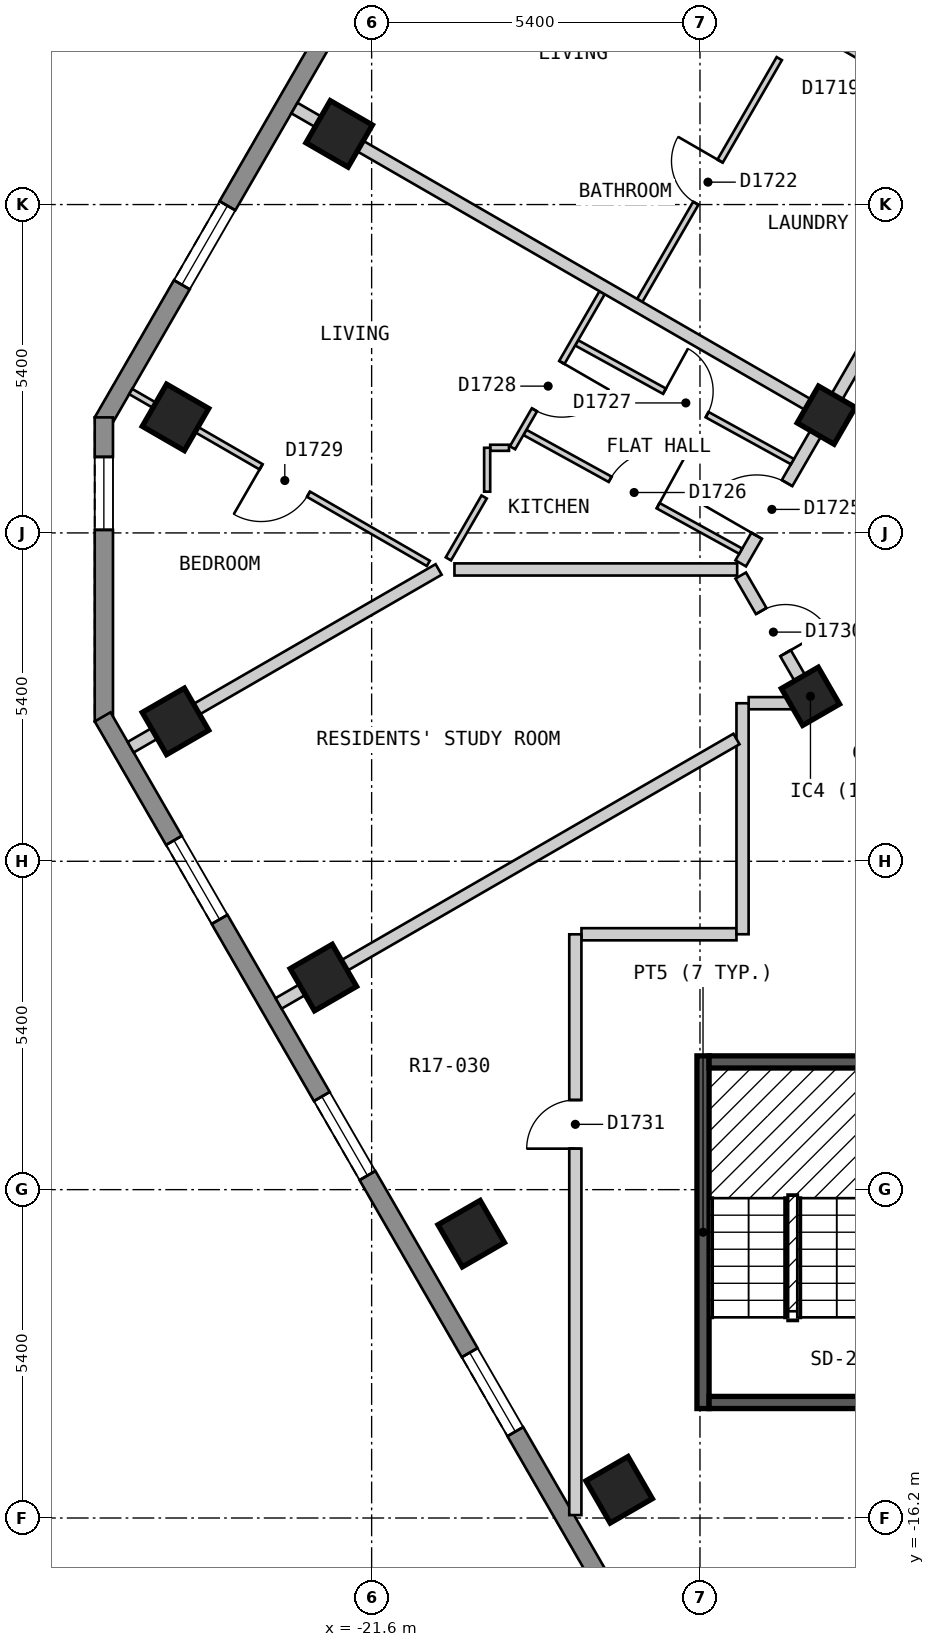
"""IFC4 building model, lengths in metres.
Left out: names, types, materials, properties, quantities, classifications, styles, units other than length and angle.
Written with IfcOpenShell. Run it as: python <this file> out.ifc"""

import sys

from ifc_helpers import new_model, si_unit, direction, frame, frame_2d, origin, origin_2d, place, context, subcontext, project, spatial, polyline, rectangle, outline, extrude, element, fill, save


model = new_model("IFC4")
c1 = context("Model", 3, precision=1e-05, world=origin(), true_north=direction((0.0, 1.0)))
c2 = subcontext(c1, "Body", "Model", "MODEL_VIEW")
j1 = project(units=[si_unit("LENGTHUNIT", "METRE"), si_unit("PLANEANGLEUNIT", "RADIAN")], contexts=[c1])
p1 = place(None, origin())
s1 = spatial("IfcSite", under=j1, at=p1, CompositionType="ELEMENT")
p2 = place(p1, origin())
s2 = spatial("IfcBuilding", under=s1, at=p2, CompositionType="ELEMENT")
p3 = place(p2, frame((0.0, 0.0, 181.2)))
s3 = spatial("IfcBuildingStorey", under=s2, at=p3, CompositionType="ELEMENT", Elevation=181.2)
for number, where, z_axis, x_axis in (
    (1, (-22.134, 6.562, 0.0), (0.0, 0.0, 1.0), (-0.5, -0.866, 0.0)),
    (2, (-24.826, 1.9, 0.0), (0.0, 0.0, 1.0), (-0.5, -0.866, 0.0)),
    (3, (-24.826, -3.099, 0.0), (0.0, 0.0, 1.0), (0.5, -0.866, 0.0)),
    (4, (-22.394, -7.312, 0.0), (0.0, 0.0, 1.0), (0.5, -0.866, 0.0)),
    (5, (-19.962, -11.524, 0.0), (0.0, 0.0, 1.0), (0.5, -0.866, 0.0)),
    (6, (-17.53, -15.736, 0.0), (0.0, 0.0, 1.0), (0.5, -0.866, 0.0)),
):
    element("IfcColumn", number, at=place(p3, frame(where, z_axis=z_axis, x_axis=x_axis)), inside=s3, PredefinedType="COLUMN", context=c2, shape_type="SweptSolid", body=[
        extrude(rectangle(XDim=0.8, YDim=0.8, at=origin_2d()), origin(), (0.0, 0.0, 1.0), 3.0),
    ])
for number, where, z_axis, x_axis in (
    (7, (-14.383, -2.687, 0.0), (0.0, 0.0, 1.0), (0.5, -0.866, 0.0)),
    (8, (-14.123, 1.937, 0.0), (0.0, 0.0, 1.0), (-0.5, -0.866, 0.0)),
):
    element("IfcColumn", number, at=place(p3, frame(where, z_axis=z_axis, x_axis=x_axis)), inside=s3, PredefinedType="COLUMN", context=c2, shape_type="SweptSolid", body=[
        extrude(rectangle(XDim=0.7, YDim=0.7, at=origin_2d()), origin(), (0.0, 0.0, 1.0), 3.0),
    ])
p4 = place(p3, frame((-14.592, 21.625, 0.0), z_axis=(0.0, 0.0, 1.0), x_axis=(-0.500010537973, -0.866019319597, 0.0)))
e9 = element("IfcWall", 9, at=p4, inside=s3, PredefinedType="SOLIDWALL", context=c2, shape_type="SweptSolid", body=[
    extrude(outline(polyline([(0.0, -0.15), (22.863, -0.15), (22.783, 0.15), (0.08, 0.15), (0.0, -0.15)])), origin(), (0.0, 0.0, 1.0), 2.7),
])
p5 = place(p4, frame((2.606, 0.0, 0.15)))
e10 = element("IfcOpeningElement", 10, at=p5, cuts=e9, PredefinedType="OPENING", context=c2, shape_type="SweptSolid", body=[
    extrude(rectangle(XDim=1.5, YDim=2.1, at=frame_2d((0.75, 1.05))), frame((0.0, 0.16, 0.0), z_axis=(0.0, -1.0, 0.0), x_axis=(1.0, 0.0, 0.0)), (0.0, 0.0, 1.0), 0.32),
])
p6 = place(p4, frame((7.99, 0.0, 0.15)))
e11 = element("IfcOpeningElement", 11, at=p6, cuts=e9, PredefinedType="OPENING", context=c2, shape_type="SweptSolid", body=[
    extrude(rectangle(XDim=1.5, YDim=2.1, at=frame_2d((0.75, 1.05))), frame((0.0, 0.16, 0.0), z_axis=(0.0, -1.0, 0.0), x_axis=(1.0, 0.0, 0.0)), (0.0, 0.0, 1.0), 0.32),
])
p7 = place(p4, frame((13.373, 0.0, 0.15)))
e12 = element("IfcOpeningElement", 12, at=p7, cuts=e9, PredefinedType="OPENING", context=c2, shape_type="SweptSolid", body=[
    extrude(rectangle(XDim=1.5, YDim=2.1, at=frame_2d((0.75, 1.05))), frame((0.0, 0.16, 0.0), z_axis=(0.0, -1.0, 0.0), x_axis=(1.0, 0.0, 0.0)), (0.0, 0.0, 1.0), 0.32),
])
p8 = place(p4, frame((18.758, 0.0, 0.15)))
e13 = element("IfcOpeningElement", 13, at=p8, cuts=e9, PredefinedType="OPENING", context=c2, shape_type="SweptSolid", body=[
    extrude(rectangle(XDim=1.5, YDim=2.1, at=frame_2d((0.75, 1.05))), frame((0.0, 0.16, 0.0), z_axis=(0.0, -1.0, 0.0), x_axis=(1.0, 0.0, 0.0)), (0.0, 0.0, 1.0), 0.32),
])
p9 = place(p3, frame((-26.004, 1.9, 0.0), z_axis=(0.0, 0.0, 1.0), x_axis=(0.0, -1.0, 0.0)))
e14 = element("IfcWall", 14, at=p9, inside=s3, PredefinedType="SOLIDWALL", context=c2, shape_type="SweptSolid", body=[
    extrude(outline(polyline([(0.0, -0.15), (5.0, -0.15), (4.92, 0.15), (0.08, 0.15), (0.0, -0.15)])), origin(), (0.0, 0.0, 1.0), 2.7),
])
p10 = place(p9, frame((0.65, 0.0, 0.15)))
e15 = element("IfcOpeningElement", 15, at=p10, cuts=e14, PredefinedType="OPENING", context=c2, shape_type="SweptSolid", body=[
    extrude(rectangle(XDim=1.2, YDim=2.1, at=frame_2d((0.6, 1.05))), frame((0.0, 0.16, 0.0), z_axis=(0.0, -1.0, 0.0), x_axis=(1.0, 0.0, 0.0)), (0.0, 0.0, 1.0), 0.32),
])
p11 = place(p3, frame((-26.024, -3.025, 0.0), z_axis=(0.0, 0.0, 1.0), x_axis=(0.500018670445, -0.86601462413, 0.0)))
e16 = element("IfcWall", 16, at=p11, inside=s3, PredefinedType="SOLIDWALL", context=c2, shape_type="SweptSolid", body=[
    extrude(outline(polyline([(0.0, -0.15), (20.785, -0.15), (20.705, 0.15), (0.08, 0.15), (0.0, -0.15)])), origin(), (0.0, 0.0, 1.0), 2.7),
])
p12 = place(p11, frame((2.346, 0.0, 0.15)))
e17 = element("IfcOpeningElement", 17, at=p12, cuts=e16, PredefinedType="OPENING", context=c2, shape_type="SweptSolid", body=[
    extrude(rectangle(XDim=1.5, YDim=2.1, at=frame_2d((0.75, 1.05))), frame((0.0, 0.16, 0.0), z_axis=(0.0, -1.0, 0.0), x_axis=(1.0, 0.0, 0.0)), (0.0, 0.0, 1.0), 0.32),
])
p13 = place(p11, frame((7.21, 0.0, 0.15)))
e18 = element("IfcOpeningElement", 18, at=p13, cuts=e16, PredefinedType="OPENING", context=c2, shape_type="SweptSolid", body=[
    extrude(rectangle(XDim=1.5, YDim=2.1, at=frame_2d((0.75, 1.05))), frame((0.0, 0.16, 0.0), z_axis=(0.0, -1.0, 0.0), x_axis=(1.0, 0.0, 0.0)), (0.0, 0.0, 1.0), 0.32),
])
p14 = place(p11, frame((12.073, 0.0, 0.15)))
e19 = element("IfcOpeningElement", 19, at=p14, cuts=e16, PredefinedType="OPENING", context=c2, shape_type="SweptSolid", body=[
    extrude(rectangle(XDim=1.5, YDim=2.1, at=frame_2d((0.75, 1.05))), frame((0.0, 0.16, 0.0), z_axis=(0.0, -1.0, 0.0), x_axis=(1.0, 0.0, 0.0)), (0.0, 0.0, 1.0), 0.32),
])
p15 = place(p11, frame((16.938, 0.0, 0.15)))
e20 = element("IfcOpeningElement", 20, at=p15, cuts=e16, PredefinedType="OPENING", context=c2, shape_type="SweptSolid", body=[
    extrude(rectangle(XDim=1.5, YDim=2.1, at=frame_2d((0.75, 1.05))), frame((0.0, 0.16, 0.0), z_axis=(0.0, -1.0, 0.0), x_axis=(1.0, 0.0, 0.0)), (0.0, 0.0, 1.0), 0.32),
])
p16 = place(p3, frame((-15.53, -0.701, 0.0), z_axis=(0.0, 0.0, 1.0), x_axis=(0.499972710878, -0.866041158593, 0.0)))
e21 = element("IfcWall", 21, at=p16, inside=s3, PredefinedType="PARTITIONING", context=c2, shape_type="SweptSolid", body=[
    extrude(rectangle(XDim=2.308, YDim=0.2, at=frame_2d((1.154, 0.0))), origin(), (0.0, 0.0, 1.0), 2.7),
])
p17 = place(p16, frame((0.674, 0.0, 0.0)))
e22 = element("IfcOpeningElement", 22, at=p17, cuts=e21, PredefinedType="OPENING", context=c2, shape_type="SweptSolid", body=[
    extrude(rectangle(XDim=0.8, YDim=2.1, at=frame_2d((0.4, 1.05))), frame((0.0, 0.11, 0.0), z_axis=(0.0, -1.0, 0.0), x_axis=(1.0, 0.0, 0.0)), (0.0, 0.0, 1.0), 0.22),
])
p18 = place(p3, frame((-18.149, -6.6, 0.0), z_axis=(0.0, 0.0, 1.0), x_axis=(1.0, 0.0, 0.0)))
e23 = element("IfcWall", 23, at=p18, inside=s3, PredefinedType="PARTITIONING", context=c2, shape_type="SweptSolid", body=[
    extrude(rectangle(XDim=2.549, YDim=0.2, at=frame_2d((1.274, 0.0))), origin(), (0.0, 0.0, 1.0), 2.7),
])
p19 = place(p3, frame((-15.399, -2.8, 0.0), z_axis=(0.0, 0.0, 1.0), x_axis=(1.0, 0.0, 0.0)))
e24 = element("IfcWall", 24, at=p19, inside=s3, PredefinedType="PARTITIONING", context=c2, shape_type="SweptSolid", body=[
    extrude(rectangle(XDim=1.081, YDim=0.2, at=frame_2d((0.541, 0.0))), origin(), (0.0, 0.0, 1.0), 2.7),
])
p20 = place(p3, frame((-15.53, -0.501, 0.0), z_axis=(0.0, 0.0, 1.0), x_axis=(0.499952498232, 0.866052827206, 0.0)))
e25 = element("IfcWall", 25, at=p20, inside=s3, PredefinedType="PARTITIONING", context=c2, shape_type="SweptSolid", body=[
    extrude(rectangle(XDim=9.585, YDim=0.2, at=frame_2d((4.792, 0.0))), origin(), (0.0, 0.0, 1.0), 2.7),
])
p21 = place(p20, frame((0.525, 0.0, 0.0)))
e26 = element("IfcOpeningElement", 26, at=p21, cuts=e25, PredefinedType="OPENING", context=c2, shape_type="SweptSolid", body=[
    extrude(rectangle(XDim=1.0, YDim=2.1, at=frame_2d((0.5, 1.05))), frame((0.0, 0.11, 0.0), z_axis=(0.0, -1.0, 0.0), x_axis=(1.0, 0.0, 0.0)), (0.0, 0.0, 1.0), 0.22),
])
p22 = place(p3, frame((-15.5, -6.6, 0.0), z_axis=(0.0, 0.0, 1.0), x_axis=(0.0, 1.0, 0.0)))
e27 = element("IfcWall", 27, at=p22, inside=s3, PredefinedType="PARTITIONING", context=c2, shape_type="SweptSolid", body=[
    extrude(rectangle(XDim=3.799, YDim=0.2, at=frame_2d((1.899, 0.0))), origin(), (0.0, 0.0, 1.0), 2.7),
])
p23 = place(p3, frame((-18.25, -16.152, 0.0), z_axis=(0.0, 0.0, 1.0), x_axis=(0.0, 1.0, 0.0)))
e28 = element("IfcWall", 28, at=p23, inside=s3, PredefinedType="PARTITIONING", context=c2, shape_type="SweptSolid", body=[
    extrude(rectangle(XDim=9.551, YDim=0.2, at=frame_2d((4.775, 0.0))), origin(), (0.0, 0.0, 1.0), 2.7),
])
p24 = place(p23, frame((6.026, 0.0, 0.0)))
e29 = element("IfcOpeningElement", 29, at=p24, cuts=e28, PredefinedType="OPENING", context=c2, shape_type="SweptSolid", body=[
    extrude(rectangle(XDim=0.8, YDim=2.1, at=frame_2d((0.4, 1.05))), frame((0.0, 0.11, 0.0), z_axis=(0.0, -1.0, 0.0), x_axis=(1.0, 0.0, 0.0)), (0.0, 0.0, 1.0), 0.22),
])
p25 = place(p3, frame((-18.229, 3.126, 0.0), z_axis=(0.0, 0.0, 1.0), x_axis=(0.876123002581, -0.482087631399, 0.0)))
e30 = element("IfcWall", 30, at=p25, inside=s3, PredefinedType="PARTITIONING", context=c2, shape_type="SweptSolid", body=[
    extrude(rectangle(XDim=4.051, YDim=0.1, at=frame_2d((2.025, 0.0))), origin(), (0.0, 0.0, 1.0), 2.7),
])
p26 = place(p25, frame((1.65, 0.0, 0.0)))
e31 = element("IfcOpeningElement", 31, at=p26, cuts=e30, PredefinedType="OPENING", context=c2, shape_type="SweptSolid", body=[
    extrude(rectangle(XDim=0.8, YDim=2.1, at=frame_2d((0.4, 1.05))), frame((0.0, 0.06, 0.0), z_axis=(0.0, -1.0, 0.0), x_axis=(1.0, 0.0, 0.0)), (0.0, 0.0, 1.0), 0.12),
])
p27 = place(p3, frame((-19.079, 1.653, 0.0), z_axis=(0.0, 0.0, 1.0), x_axis=(0.876097546615, -0.482133890963, 0.0)))
e32 = element("IfcWall", 32, at=p27, inside=s3, PredefinedType="PARTITIONING", context=c2, shape_type="SweptSolid", body=[
    extrude(rectangle(XDim=4.051, YDim=0.1, at=frame_2d((2.025, 0.0))), origin(), (0.0, 0.0, 1.0), 2.7),
])
p28 = place(p27, frame((1.6, 0.0, 0.0)))
e33 = element("IfcOpeningElement", 33, at=p28, cuts=e32, PredefinedType="OPENING", context=c2, shape_type="SweptSolid", body=[
    extrude(rectangle(XDim=0.9, YDim=2.1, at=frame_2d((0.45, 1.05))), frame((0.0, 0.06, 0.0), z_axis=(0.0, -1.0, 0.0), x_axis=(1.0, 0.0, 0.0)), (0.0, 0.0, 1.0), 0.12),
])
p29 = place(p3, frame((-25.562, 2.325, 0.0), z_axis=(0.0, 0.0, 1.0), x_axis=(0.865998530728, -0.500046542611, 0.0)))
e34 = element("IfcWall", 34, at=p29, inside=s3, PredefinedType="PARTITIONING", context=c2, shape_type="SweptSolid", body=[
    extrude(rectangle(XDim=5.651, YDim=0.1, at=frame_2d((2.826, 0.0))), origin(), (0.0, 0.0, 1.0), 2.7),
])
p30 = place(p29, frame((2.476, 0.0, 0.0)))
e35 = element("IfcOpeningElement", 35, at=p30, cuts=e34, PredefinedType="OPENING", context=c2, shape_type="SweptSolid", body=[
    extrude(rectangle(XDim=0.9, YDim=2.1, at=frame_2d((0.45, 1.05))), frame((0.0, 0.06, 0.0), z_axis=(0.0, -1.0, 0.0), x_axis=(1.0, 0.0, 0.0)), (0.0, 0.0, 1.0), 0.12),
])
p31 = place(p3, frame((-14.679, 8.475, 0.0), z_axis=(0.0, 0.0, 1.0), x_axis=(0.865995104784, -0.500052475737, 0.0)))
e36 = element("IfcWall", 36, at=p31, inside=s3, PredefinedType="PARTITIONING", context=c2, shape_type="SweptSolid", body=[
    extrude(rectangle(XDim=3.65, YDim=0.1, at=frame_2d((1.825, 0.0))), origin(), (0.0, 0.0, 1.0), 2.7),
])
p32 = place(p3, frame((-19.65, 1.4, 0.0), z_axis=(0.0, 0.0, 1.0), x_axis=(1.0, 0.0, 0.0)))
e37 = element("IfcWall", 37, at=p32, inside=s3, PredefinedType="PARTITIONING", context=c2, shape_type="SweptSolid", body=[
    extrude(rectangle(XDim=0.309, YDim=0.1, at=frame_2d((0.154, 0.0))), origin(), (0.0, 0.0, 1.0), 2.7),
])
p33 = place(p3, frame((-17.191, 3.824, 0.0), z_axis=(0.0, 0.0, 1.0), x_axis=(0.499891250406, 0.866088181288, 0.0)))
e38 = element("IfcWall", 38, at=p33, inside=s3, PredefinedType="PARTITIONING", context=c2, shape_type="SweptSolid", body=[
    extrude(rectangle(XDim=4.591, YDim=0.1, at=frame_2d((2.295, 0.0))), origin(), (0.0, 0.0, 1.0), 2.7),
])
p34 = place(p33, frame((1.845, 0.0, 0.0)))
e39 = element("IfcOpeningElement", 39, at=p34, cuts=e38, PredefinedType="OPENING", context=c2, shape_type="SweptSolid", body=[
    extrude(rectangle(XDim=0.8, YDim=2.1, at=frame_2d((0.4, 1.05))), frame((0.0, 0.06, 0.0), z_axis=(0.0, -1.0, 0.0), x_axis=(1.0, 0.0, 0.0)), (0.0, 0.0, 1.0), 0.12),
])
p35 = place(p3, frame((-20.338, -0.427, 0.0), z_axis=(0.0, 0.0, 1.0), x_axis=(0.500069990121, 0.865984991198, 0.0)))
e40 = element("IfcWall", 40, at=p35, inside=s3, PredefinedType="PARTITIONING", context=c2, shape_type="SweptSolid", body=[
    extrude(rectangle(XDim=1.176, YDim=0.1, at=frame_2d((0.588, 0.0))), origin(), (0.0, 0.0, 1.0), 2.7),
])
p36 = place(p3, frame((-19.283, 1.4, 0.0), z_axis=(0.0, 0.0, 1.0), x_axis=(0.500160189342, 0.865932898669, 0.0)))
e41 = element("IfcWall", 41, at=p36, inside=s3, PredefinedType="PARTITIONING", context=c2, shape_type="SweptSolid", body=[
    extrude(rectangle(XDim=2.945, YDim=0.1, at=frame_2d((1.472, 0.0))), origin(), (0.0, 0.0, 1.0), 2.7),
])
p37 = place(p36, frame((0.721, 0.0, 0.0)))
e42 = element("IfcOpeningElement", 42, at=p37, cuts=e41, PredefinedType="OPENING", context=c2, shape_type="SweptSolid", body=[
    extrude(rectangle(XDim=0.9, YDim=2.1, at=frame_2d((0.45, 1.05))), frame((0.0, 0.06, 0.0), z_axis=(0.0, -1.0, 0.0), x_axis=(1.0, 0.0, 0.0)), (0.0, 0.0, 1.0), 0.12),
])
p38 = place(p3, frame((-19.7, 0.678, 0.0), z_axis=(0.0, 0.0, 1.0), x_axis=(0.0, 1.0, 0.0)))
e43 = element("IfcWall", 43, at=p38, inside=s3, PredefinedType="PARTITIONING", context=c2, shape_type="SweptSolid", body=[
    extrude(rectangle(XDim=0.722, YDim=0.1, at=frame_2d((0.361, 0.0))), origin(), (0.0, 0.0, 1.0), 2.7),
])
p39 = place(p3, frame((-22.87, 6.987, 0.0), z_axis=(0.0, 0.0, 1.0), x_axis=(0.866022959057, -0.500004234368, 0.0)))
e44 = element("IfcWall", 44, at=p39, inside=s3, PredefinedType="PARTITIONING", context=c2, shape_type="SweptSolid", body=[
    extrude(rectangle(XDim=10.0, YDim=0.2, at=frame_2d((5.0, 0.0))), origin(), (0.0, 0.0, 1.0), 2.7),
])
p40 = place(p3, frame((-20.238, -0.601, 0.0), z_axis=(0.0, 0.0, 1.0), x_axis=(1.0, 0.0, 0.0)))
e45 = element("IfcWall", 45, at=p40, inside=s3, PredefinedType="PARTITIONING", context=c2, shape_type="SweptSolid", body=[
    extrude(rectangle(XDim=4.65, YDim=0.2, at=frame_2d((2.325, 0.0))), origin(), (0.0, 0.0, 1.0), 2.7),
])
p41 = place(p3, frame((-23.13, -7.737, 0.0), z_axis=(0.0, 0.0, 1.0), x_axis=(0.86598451299, 0.500070818246, 0.0)))
e46 = element("IfcWall", 46, at=p41, inside=s3, PredefinedType="PARTITIONING", context=c2, shape_type="SweptSolid", body=[
    extrude(rectangle(XDim=8.695, YDim=0.2, at=frame_2d((4.348, 0.0))), origin(), (0.0, 0.0, 1.0), 2.7),
])
p42 = place(p3, frame((-25.563, -3.524, 0.0), z_axis=(0.0, 0.0, 1.0), x_axis=(0.866128586522, 0.499821239653, 0.0)))
e47 = element("IfcWall", 47, at=p42, inside=s3, PredefinedType="PARTITIONING", context=c2, shape_type="SweptSolid", body=[
    extrude(rectangle(XDim=5.848, YDim=0.2, at=frame_2d((2.924, 0.0))), origin(), (0.0, 0.0, 1.0), 2.7),
])
p43 = place(p3, frame((-16.15, -14.4, 0.0), z_axis=(0.0, 0.0, 1.0), x_axis=(0.0, 1.0, 0.0)))
e48 = element("IfcWall", 48, at=p43, inside=s3, PredefinedType="SOLIDWALL", context=c2, shape_type="SweptSolid", body=[
    extrude(rectangle(XDim=5.8, YDim=0.2, at=frame_2d((2.9, 0.0))), origin(), (0.0, 0.0, 1.0), 2.7),
])
for number, where, z_axis, x_axis in (
    (49, (-16.05, -14.3, 0.0), (0.0, 0.0, 1.0), (1.0, 0.0, 0.0)),
    (50, (-16.05, -8.7, 0.0), (0.0, 0.0, 1.0), (1.0, 0.0, 0.0)),
):
    element("IfcWall", number, at=place(p3, frame(where, z_axis=z_axis, x_axis=x_axis)), inside=s3, PredefinedType="SOLIDWALL", context=c2, shape_type="SweptSolid", body=[
        extrude(rectangle(XDim=2.75, YDim=0.2, at=frame_2d((1.375, 0.0))), origin(), (0.0, 0.0, 1.0), 2.7),
    ])
p44 = place(p8, origin())
e51 = element("IfcWindow", 51, at=p44, inside=s3, PartitioningType="SINGLE_PANEL", PredefinedType="WINDOW", context=c2, shape_type="SweptSolid", body=[
    extrude(rectangle(XDim=1.5, YDim=2.1, at=frame_2d((0.75, 1.05))), frame((0.0, 0.03, 0.0), z_axis=(0.0, -1.0, 0.0), x_axis=(1.0, 0.0, 0.0)), (0.0, 0.0, 1.0), 0.06),
])
fill(e13, e51)
p45 = place(p10, origin())
e52 = element("IfcWindow", 52, at=p45, inside=s3, PartitioningType="SINGLE_PANEL", PredefinedType="WINDOW", context=c2, shape_type="SweptSolid", body=[
    extrude(rectangle(XDim=1.2, YDim=2.1, at=frame_2d((0.6, 1.05))), frame((0.0, 0.03, 0.0), z_axis=(0.0, -1.0, 0.0), x_axis=(1.0, 0.0, 0.0)), (0.0, 0.0, 1.0), 0.06),
])
fill(e15, e52)
p46 = place(p12, origin())
e53 = element("IfcWindow", 53, at=p46, inside=s3, PartitioningType="SINGLE_PANEL", PredefinedType="WINDOW", context=c2, shape_type="SweptSolid", body=[
    extrude(rectangle(XDim=1.5, YDim=2.1, at=frame_2d((0.75, 1.05))), frame((0.0, 0.03, 0.0), z_axis=(0.0, -1.0, 0.0), x_axis=(1.0, 0.0, 0.0)), (0.0, 0.0, 1.0), 0.06),
])
fill(e17, e53)
p47 = place(p13, origin())
e54 = element("IfcWindow", 54, at=p47, inside=s3, PartitioningType="SINGLE_PANEL", PredefinedType="WINDOW", context=c2, shape_type="SweptSolid", body=[
    extrude(rectangle(XDim=1.5, YDim=2.1, at=frame_2d((0.75, 1.05))), frame((0.0, 0.03, 0.0), z_axis=(0.0, -1.0, 0.0), x_axis=(1.0, 0.0, 0.0)), (0.0, 0.0, 1.0), 0.06),
])
fill(e18, e54)
p48 = place(p14, origin())
e55 = element("IfcWindow", 55, at=p48, inside=s3, PartitioningType="SINGLE_PANEL", PredefinedType="WINDOW", context=c2, shape_type="SweptSolid", body=[
    extrude(rectangle(XDim=1.5, YDim=2.1, at=frame_2d((0.75, 1.05))), frame((0.0, 0.03, 0.0), z_axis=(0.0, -1.0, 0.0), x_axis=(1.0, 0.0, 0.0)), (0.0, 0.0, 1.0), 0.06),
])
fill(e19, e55)
p49 = place(p34, origin())
e56 = element("IfcDoor", 56, at=p49, inside=s3, OperationType="SINGLE_SWING_RIGHT", PredefinedType="DOOR", context=c2, shape_type="SweptSolid", body=[
    extrude(rectangle(XDim=0.8, YDim=2.1, at=frame_2d((0.4, 1.05))), frame((0.0, 0.025, 0.0), z_axis=(0.0, -1.0, 0.0), x_axis=(1.0, 0.0, 0.0)), (0.0, 0.0, 1.0), 0.05),
])
fill(e39, e56)
p50 = place(p21, origin())
e57 = element("IfcDoor", 57, at=p50, inside=s3, OperationType="SINGLE_SWING_LEFT", PredefinedType="DOOR", context=c2, shape_type="SweptSolid", body=[
    extrude(rectangle(XDim=1.0, YDim=2.1, at=frame_2d((0.5, 1.05))), frame((0.0, 0.025, 0.0), z_axis=(0.0, -1.0, 0.0), x_axis=(1.0, 0.0, 0.0)), (0.0, 0.0, 1.0), 0.05),
])
fill(e26, e57)
p51 = place(p28, origin())
e58 = element("IfcDoor", 58, at=p51, inside=s3, OperationType="SINGLE_SWING_RIGHT", PredefinedType="DOOR", context=c2, shape_type="SweptSolid", body=[
    extrude(rectangle(XDim=0.9, YDim=2.1, at=frame_2d((0.45, 1.05))), frame((0.0, 0.025, 0.0), z_axis=(0.0, -1.0, 0.0), x_axis=(1.0, 0.0, 0.0)), (0.0, 0.0, 1.0), 0.05),
])
fill(e33, e58)
p52 = place(p26, origin())
e59 = element("IfcDoor", 59, at=p52, inside=s3, OperationType="SINGLE_SWING_LEFT", PredefinedType="DOOR", context=c2, shape_type="SweptSolid", body=[
    extrude(rectangle(XDim=0.8, YDim=2.1, at=frame_2d((0.4, 1.05))), frame((0.0, 0.025, 0.0), z_axis=(0.0, -1.0, 0.0), x_axis=(1.0, 0.0, 0.0)), (0.0, 0.0, 1.0), 0.05),
])
fill(e31, e59)
p53 = place(p37, origin())
e60 = element("IfcDoor", 60, at=p53, inside=s3, OperationType="SINGLE_SWING_RIGHT", PredefinedType="DOOR", context=c2, shape_type="SweptSolid", body=[
    extrude(rectangle(XDim=0.9, YDim=2.1, at=frame_2d((0.45, 1.05))), frame((0.0, 0.025, 0.0), z_axis=(0.0, -1.0, 0.0), x_axis=(1.0, 0.0, 0.0)), (0.0, 0.0, 1.0), 0.05),
])
fill(e42, e60)
p54 = place(p30, origin())
e61 = element("IfcDoor", 61, at=p54, inside=s3, OperationType="SINGLE_SWING_LEFT", PredefinedType="DOOR", context=c2, shape_type="SweptSolid", body=[
    extrude(rectangle(XDim=0.9, YDim=2.1, at=frame_2d((0.45, 1.05))), frame((0.0, 0.025, 0.0), z_axis=(0.0, -1.0, 0.0), x_axis=(1.0, 0.0, 0.0)), (0.0, 0.0, 1.0), 0.05),
])
fill(e35, e61)
p55 = place(p17, origin())
e62 = element("IfcDoor", 62, at=p55, inside=s3, OperationType="SINGLE_SWING_RIGHT", PredefinedType="DOOR", context=c2, shape_type="SweptSolid", body=[
    extrude(rectangle(XDim=0.8, YDim=2.1, at=frame_2d((0.4, 1.05))), frame((0.0, 0.025, 0.0), z_axis=(0.0, -1.0, 0.0), x_axis=(1.0, 0.0, 0.0)), (0.0, 0.0, 1.0), 0.05),
])
fill(e22, e62)
p56 = place(p24, origin())
e63 = element("IfcDoor", 63, at=p56, inside=s3, OperationType="SINGLE_SWING_LEFT", PredefinedType="DOOR", context=c2, shape_type="SweptSolid", body=[
    extrude(rectangle(XDim=0.8, YDim=2.1, at=frame_2d((0.4, 1.05))), frame((0.0, 0.025, 0.0), z_axis=(0.0, -1.0, 0.0), x_axis=(1.0, 0.0, 0.0)), (0.0, 0.0, 1.0), 0.05),
])
fill(e29, e63)
save(model, sys.argv[1])
